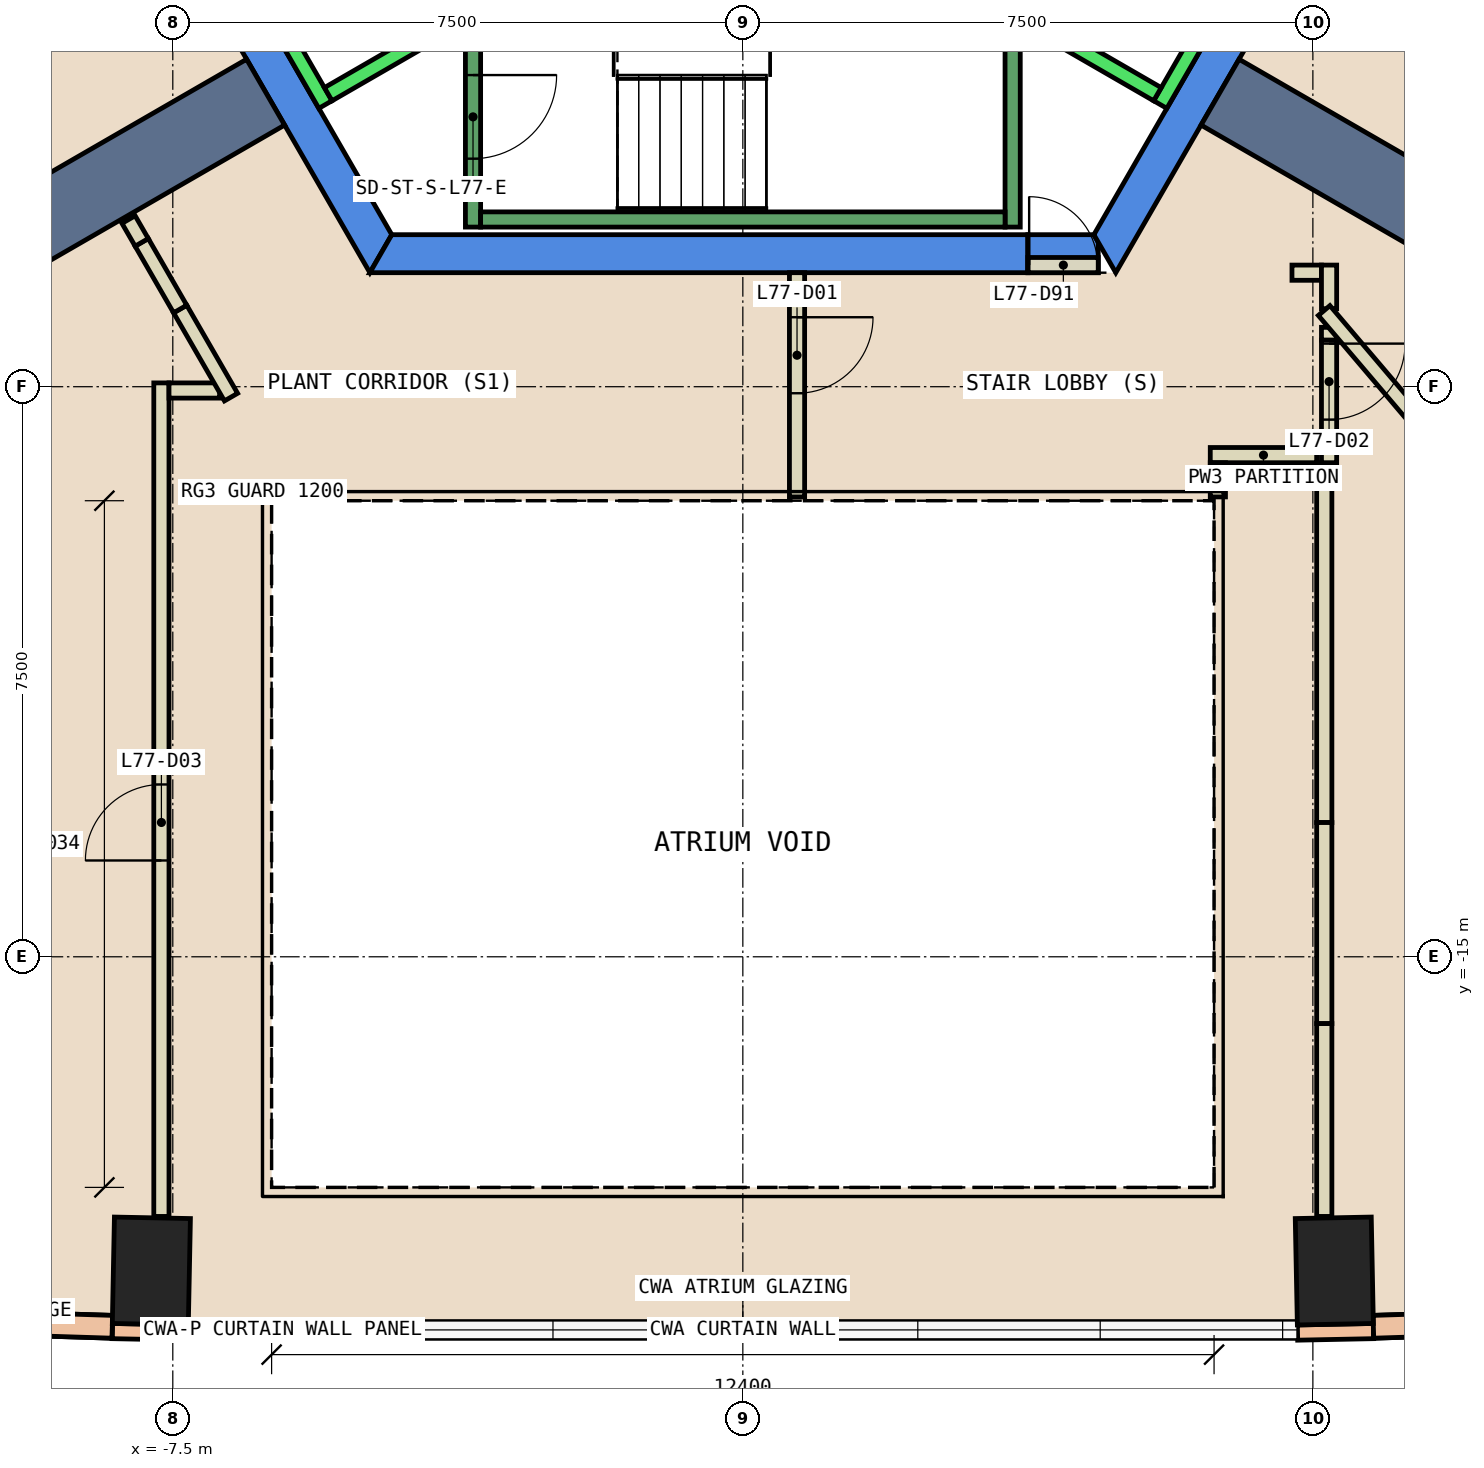
"""IFC4 building model, lengths in metres.
Left out: names, types, materials, properties, quantities, classifications, styles, units other than length and angle.
Written with IfcOpenShell. Run it as: python <this file> out.ifc"""

import sys

from ifc_helpers import new_model, si_unit, direction, frame, frame_2d, origin, origin_2d, place, context, subcontext, project, spatial, polyline, rectangle, outline, extrude, element, fill, save


model = new_model("IFC4")
c1 = context("Model", 3, precision=1e-05, world=origin(), true_north=direction((0.0, 1.0)))
c2 = subcontext(c1, "Body", "Model", "MODEL_VIEW")
j1 = project(units=[si_unit("LENGTHUNIT", "METRE"), si_unit("PLANEANGLEUNIT", "RADIAN")], contexts=[c1])
p1 = place(None, origin())
s1 = spatial("IfcSite", under=j1, at=p1, CompositionType="ELEMENT")
p2 = place(p1, origin())
s2 = spatial("IfcBuilding", under=s1, at=p2, CompositionType="ELEMENT")
p3 = place(p2, frame((0.0, 0.0, 326.0)))
s3 = spatial("IfcBuildingStorey", under=s2, at=p3, CompositionType="ELEMENT", Elevation=326.0)
for number, where, z_axis, x_axis in (
    (1, (-7.782, -19.134, -0.6), (0.0, 0.0, 1.0), (-1.0, 0.02, 0.0)),
    (2, (7.782, -19.134, -0.6), (0.0, 0.0, 1.0), (1.0, 0.02, 0.0)),
):
    element("IfcColumn", number, at=place(p3, frame(where, z_axis=z_axis, x_axis=x_axis)), inside=s3, PredefinedType="COLUMN", context=c2, shape_type="SweptSolid", body=[
        extrude(rectangle(XDim=1.0, YDim=1.4, at=origin_2d()), origin(), (0.0, 0.0, 1.0), 5.55),
    ])
p4 = place(p3, frame((0.0, 0.0, -0.6)))
e3 = element("IfcWall", 3, at=p4, inside=s3, PredefinedType="SHEAR", context=c2, shape_type="SweptSolid", body=[
    extrude(outline(polyline([(-9.815, 2.5), (-4.907, -6.0), (-4.619, -5.5), (-9.238, 2.5), (-9.815, 2.5)])), origin(), (0.0, 0.0, 1.0), 5.55),
])
p5 = place(p3, frame((0.0, 0.0, -0.6)))
e4 = element("IfcWall", 4, at=p5, inside=s3, PredefinedType="SHEAR", context=c2, shape_type="SweptSolid", body=[
    extrude(outline(polyline([(3.75, -6.0), (3.75, -5.5), (-4.619, -5.5), (-4.907, -6.0), (3.75, -6.0)])), origin(), (0.0, 0.0, 1.0), 5.55),
])
p6 = place(p3, frame((0.0, 0.0, 3.6)))
e5 = element("IfcWall", 5, at=p6, inside=s3, PredefinedType="SHEAR", context=c2, shape_type="SweptSolid", body=[
    extrude(outline(polyline([(4.676, -6.0), (4.676, -5.6), (4.619, -5.5), (3.75, -5.5), (3.75, -6.0), (4.676, -6.0)])), origin(), (0.0, 0.0, 1.0), 1.35),
])
p7 = place(p3, frame((0.0, 0.0, -0.6)))
e6 = element("IfcWall", 6, at=p7, inside=s3, PredefinedType="SHEAR", context=c2, shape_type="SweptSolid", body=[
    extrude(outline(polyline([(4.907, -6.0), (9.815, 2.5), (9.238, 2.5), (4.619, -5.5), (4.907, -6.0)])), origin(), (0.0, 0.0, 1.0), 5.55),
])
for number, where, z_axis, x_axis in (
    (7, (6.279, -3.625, 0.0), (0.0, 0.0, 1.0), (0.866, -0.5, 0.0)),
    (8, (-6.279, -3.625, 0.0), (0.0, 0.0, 1.0), (-0.866, -0.5, 0.0)),
):
    element("IfcWall", number, at=place(p3, frame(where, z_axis=z_axis, x_axis=x_axis)), inside=s3, PredefinedType="SHEAR", context=c2, shape_type="SweptSolid", body=[
        extrude(rectangle(XDim=17.452, YDim=1.0, at=frame_2d((8.726, 0.0))), origin(), (0.0, 0.0, 1.0), 4.95),
    ])
for number, where, z_axis, x_axis in (
    (9, (-8.298, -19.924, 0.0), (0.0, 0.0, 1.0), (1.0, -0.02, 0.0)),
    (10, (7.298, -19.944, 0.0), (0.0, 0.0, 1.0), (1.0, 0.02, 0.0)),
):
    element("IfcWall", number, at=place(p3, frame(where, z_axis=z_axis, x_axis=x_axis)), inside=s3, PredefinedType="STANDARD", context=c2, shape_type="SweptSolid", body=[
        extrude(rectangle(XDim=1.0, YDim=0.2, at=frame_2d((0.5, 0.0))), origin(), (0.0, 0.0, 1.0), 4.95),
    ])
p8 = place(p3, frame((-11.919, -19.753, 0.0), z_axis=(0.0, 0.0, 1.0), x_axis=(0.9994967126, -0.031722570865, 0.0)))
e11 = element("IfcWall", 11, at=p8, inside=s3, PredefinedType="STANDARD", context=c2, shape_type="SweptSolid", body=[
    extrude(rectangle(XDim=3.625, YDim=0.3, at=frame_2d((1.812, 0.0))), origin(), (0.0, 0.0, 1.0), 1.2),
])
p9 = place(p3, frame((-11.919, -19.753, 4.15), z_axis=(0.0, 0.0, 1.0), x_axis=(0.9994967126, -0.031722570865, 0.0)))
e12 = element("IfcWall", 12, at=p9, inside=s3, PredefinedType="STANDARD", context=c2, shape_type="SweptSolid", body=[
    extrude(rectangle(XDim=3.625, YDim=0.3, at=frame_2d((1.812, 0.0))), origin(), (0.0, 0.0, 1.0), 0.8),
])
p10 = place(p3, frame((8.296, -19.868, 0.0), z_axis=(0.0, 0.0, 1.0), x_axis=(0.9994967126, 0.031722570865, 0.0)))
e13 = element("IfcWall", 13, at=p10, inside=s3, PredefinedType="STANDARD", context=c2, shape_type="SweptSolid", body=[
    extrude(rectangle(XDim=3.625, YDim=0.3, at=frame_2d((1.812, 0.0))), origin(), (0.0, 0.0, 1.0), 1.2),
])
p11 = place(p3, frame((8.296, -19.868, 4.15), z_axis=(0.0, 0.0, 1.0), x_axis=(0.9994967126, 0.031722570865, 0.0)))
e14 = element("IfcWall", 14, at=p11, inside=s3, PredefinedType="STANDARD", context=c2, shape_type="SweptSolid", body=[
    extrude(rectangle(XDim=3.625, YDim=0.3, at=frame_2d((1.812, 0.0))), origin(), (0.0, 0.0, 1.0), 0.8),
])
p12 = place(p3, frame((0.713, -6.0, 0.0), z_axis=(0.0, 0.0, 1.0), x_axis=(0.0, -1.0, 0.0)))
e15 = element("IfcWall", 15, at=p12, inside=s3, PredefinedType="PARTITIONING", context=c2, shape_type="SweptSolid", body=[
    extrude(rectangle(XDim=2.95, YDim=0.2, at=frame_2d((1.475, 0.0))), origin(), (0.0, 0.0, 1.0), 4.95),
])
p13 = place(p12, frame((0.586, 0.0, 0.0)))
e16 = element("IfcOpeningElement", 16, at=p13, cuts=e15, PredefinedType="OPENING", context=c2, shape_type="SweptSolid", body=[
    extrude(rectangle(XDim=1.0, YDim=2.1, at=frame_2d((0.5, 1.05))), frame((0.0, 0.11, 0.0), z_axis=(0.0, -1.0, 0.0), x_axis=(1.0, 0.0, 0.0)), (0.0, 0.0, 1.0), 0.22),
])
p14 = place(p3, frame((7.55, -8.4, 0.0), z_axis=(0.0, 0.0, 1.0), x_axis=(-1.0, 0.0, 0.0)))
e17 = element("IfcWall", 17, at=p14, inside=s3, PredefinedType="PARTITIONING", context=c2, shape_type="SweptSolid", body=[
    extrude(rectangle(XDim=1.4, YDim=0.2, at=frame_2d((0.7, 0.0))), origin(), (0.0, 0.0, 1.0), 4.95),
])
p15 = place(p3, frame((6.25, -8.5, 0.0), z_axis=(0.0, 0.0, 1.0), x_axis=(0.0, -1.0, 0.0)))
e18 = element("IfcWall", 18, at=p15, inside=s3, PredefinedType="PARTITIONING", context=c2, shape_type="SweptSolid", body=[
    extrude(rectangle(XDim=0.45, YDim=0.2, at=frame_2d((0.225, 0.0))), origin(), (0.0, 0.0, 1.0), 4.95),
])
p16 = place(p3, frame((7.713, -6.719, 0.0), z_axis=(0.0, 0.0, 1.0), x_axis=(0.0, -1.0, 0.0)))
e19 = element("IfcWall", 19, at=p16, inside=s3, PredefinedType="PARTITIONING", context=c2, shape_type="SweptSolid", body=[
    extrude(rectangle(XDim=0.169, YDim=0.2, at=frame_2d((0.084, 0.0))), origin(), (0.0, 0.0, 1.0), 2.55),
])
p17 = place(p3, frame((7.225, -6.0, 0.0), z_axis=(0.0, 0.0, 1.0), x_axis=(1.0, 0.0, 0.0)))
e20 = element("IfcWall", 20, at=p17, inside=s3, PredefinedType="PARTITIONING", context=c2, shape_type="SweptSolid", body=[
    extrude(rectangle(XDim=0.388, YDim=0.2, at=frame_2d((0.194, 0.0))), origin(), (0.0, 0.0, 1.0), 2.55),
])
p18 = place(p3, frame((7.713, -5.9, 0.0), z_axis=(0.0, 0.0, 1.0), x_axis=(0.0, -1.0, 0.0)))
e21 = element("IfcWall", 21, at=p18, inside=s3, PredefinedType="PARTITIONING", context=c2, shape_type="SweptSolid", body=[
    extrude(rectangle(XDim=0.574, YDim=0.2, at=frame_2d((0.287, 0.0))), origin(), (0.0, 0.0, 1.0), 2.55),
])
p19 = place(p3, frame((7.65, -8.5, 0.0), z_axis=(0.0, 0.0, 1.0), x_axis=(0.0, -1.0, 0.0)))
e22 = element("IfcWall", 22, at=p19, inside=s3, PredefinedType="PARTITIONING", context=c2, shape_type="SweptSolid", body=[
    extrude(rectangle(XDim=4.734, YDim=0.2, at=frame_2d((2.367, 0.0))), origin(), (0.0, 0.0, 1.0), 4.95),
])
p20 = place(p3, frame((-7.65, -18.416, 0.0), z_axis=(0.0, 0.0, 1.0), x_axis=(0.0, 1.0, 0.0)))
e23 = element("IfcWall", 23, at=p20, inside=s3, PredefinedType="PARTITIONING", context=c2, shape_type="SweptSolid", body=[
    extrude(rectangle(XDim=10.966, YDim=0.2, at=frame_2d((5.483, 0.0))), origin(), (0.0, 0.0, 1.0), 4.95),
])
p21 = place(p20, frame((4.683, 0.0, 0.0)))
e24 = element("IfcOpeningElement", 24, at=p21, cuts=e23, PredefinedType="OPENING", context=c2, shape_type="SweptSolid", body=[
    extrude(rectangle(XDim=1.0, YDim=2.1, at=frame_2d((0.5, 1.05))), frame((0.0, 0.11, 0.0), z_axis=(0.0, -1.0, 0.0), x_axis=(1.0, 0.0, 0.0)), (0.0, 0.0, 1.0), 0.22),
])
p22 = place(p3, frame((-7.55, -7.55, 0.0), z_axis=(0.0, 0.0, 1.0), x_axis=(1.0, 0.0, 0.0)))
e25 = element("IfcWall", 25, at=p22, inside=s3, PredefinedType="PARTITIONING", context=c2, shape_type="SweptSolid", body=[
    extrude(rectangle(XDim=0.666, YDim=0.2, at=frame_2d((0.333, 0.0))), origin(), (0.0, 0.0, 1.0), 4.95),
])
p23 = place(p3, frame((-6.734, -7.637, 0.0), z_axis=(0.0, 0.0, 1.0), x_axis=(-0.500043546414, 0.866000260791, 0.0)))
e26 = element("IfcWall", 26, at=p23, inside=s3, PredefinedType="PARTITIONING", context=c2, shape_type="SweptSolid", body=[
    extrude(rectangle(XDim=1.338, YDim=0.2, at=frame_2d((0.669, 0.0))), origin(), (0.0, 0.0, 1.0), 4.95),
])
p24 = place(p3, frame((7.648, -6.498, 0.0), z_axis=(0.0, 0.0, 1.0), x_axis=(0.647664127958, -0.761925965798, 0.0)))
e27 = element("IfcWall", 27, at=p24, inside=s3, PredefinedType="PARTITIONING", context=c2, shape_type="SweptSolid", body=[
    extrude(rectangle(XDim=9.023, YDim=0.2, at=frame_2d((4.512, 0.0))), origin(), (0.0, 0.0, 1.0), 2.55),
])
p25 = place(p24, frame((7.13, 0.0, 0.0)))
e28 = element("IfcOpeningElement", 28, at=p25, cuts=e27, PredefinedType="OPENING", context=c2, shape_type="SweptSolid", body=[
    extrude(rectangle(XDim=1.0, YDim=2.1, at=frame_2d((0.5, 1.05))), frame((0.0, 0.11, 0.0), z_axis=(0.0, -1.0, 0.0), x_axis=(1.0, 0.0, 0.0)), (0.0, 0.0, 1.0), 0.22),
])
p26 = place(p3, frame((3.75, -5.9, 0.0), z_axis=(0.0, 0.0, 1.0), x_axis=(1.0, 0.0, 0.0)))
e29 = element("IfcWall", 29, at=p26, inside=s3, PredefinedType="PARTITIONING", context=c2, shape_type="SweptSolid", body=[
    extrude(rectangle(XDim=0.926, YDim=0.2, at=frame_2d((0.463, 0.0))), origin(), (0.0, 0.0, 1.0), 2.4),
])
p27 = place(p26, frame((0.017, 0.0, 0.0)))
e30 = element("IfcOpeningElement", 30, at=p27, cuts=e29, PredefinedType="OPENING", context=c2, shape_type="SweptSolid", body=[
    extrude(rectangle(XDim=0.9, YDim=2.1, at=frame_2d((0.45, 1.05))), frame((0.0, 0.11, 0.0), z_axis=(0.0, -1.0, 0.0), x_axis=(1.0, 0.0, 0.0)), (0.0, 0.0, 1.0), 0.22),
])
p28 = place(p3, frame((7.713, -6.888, 0.0), z_axis=(0.0, 0.0, 1.0), x_axis=(0.0, -1.0, 0.0)))
e31 = element("IfcWall", 31, at=p28, inside=s3, PredefinedType="PARTITIONING", context=c2, shape_type="SweptSolid", body=[
    extrude(rectangle(XDim=1.612, YDim=0.2, at=frame_2d((0.806, 0.0))), origin(), (0.0, 0.0, 1.0), 4.95),
])
p29 = place(p28, frame((0.045, 0.0, 0.0)))
e32 = element("IfcOpeningElement", 32, at=p29, cuts=e31, PredefinedType="OPENING", context=c2, shape_type="SweptSolid", body=[
    extrude(rectangle(XDim=1.0, YDim=2.1, at=frame_2d((0.5, 1.05))), frame((0.0, 0.11, 0.0), z_axis=(0.0, -1.0, 0.0), x_axis=(1.0, 0.0, 0.0)), (0.0, 0.0, 1.0), 0.22),
])
p30 = place(p3, frame((7.65, -13.234, 0.0), z_axis=(0.0, 0.0, 1.0), x_axis=(0.0, -1.0, 0.0)))
e33 = element("IfcWall", 33, at=p30, inside=s3, PredefinedType="PARTITIONING", context=c2, shape_type="SweptSolid", body=[
    extrude(rectangle(XDim=2.645, YDim=0.2, at=frame_2d((1.323, 0.0))), origin(), (0.0, 0.0, 1.0), 2.55),
])
p31 = place(p3, frame((7.65, -15.879, 0.0), z_axis=(0.0, 0.0, 1.0), x_axis=(0.0, -1.0, 0.0)))
e34 = element("IfcWall", 34, at=p31, inside=s3, PredefinedType="PARTITIONING", context=c2, shape_type="SweptSolid", body=[
    extrude(rectangle(XDim=2.537, YDim=0.2, at=frame_2d((1.269, 0.0))), origin(), (0.0, 0.0, 1.0), 4.95),
])
p32 = place(p3, frame((-7.403, -6.478, 0.0), z_axis=(0.0, 0.0, 1.0), x_axis=(-0.499666781426, 0.866217702163, 0.0)))
e35 = element("IfcWall", 35, at=p32, inside=s3, PredefinedType="PARTITIONING", context=c2, shape_type="SweptSolid", body=[
    extrude(rectangle(XDim=1.012, YDim=0.2, at=frame_2d((0.506, 0.0))), origin(), (0.0, 0.0, 1.0), 2.55),
])
p33 = place(p3, frame((-7.909, -5.601, 0.0), z_axis=(0.0, 0.0, 1.0), x_axis=(-0.499702115105, 0.866197319414, 0.0)))
e36 = element("IfcWall", 36, at=p33, inside=s3, PredefinedType="PARTITIONING", context=c2, shape_type="SweptSolid", body=[
    extrude(rectangle(XDim=0.346, YDim=0.2, at=frame_2d((0.173, 0.0))), origin(), (0.0, 0.0, 1.0), 4.95),
])
p34 = place(p3, frame((-22.497, -10.489, 0.0), z_axis=(0.0, 0.0, 1.0), x_axis=(0.866019262169, 0.500010637439, 0.0)))
e37 = element("IfcWall", 37, at=p34, inside=s3, PredefinedType="PARTITIONING", context=c2, shape_type="SweptSolid", body=[
    extrude(rectangle(XDim=17.478, YDim=0.2, at=frame_2d((8.739, 0.0))), origin(), (0.0, 0.0, 1.0), 4.95),
])
p35 = place(p3, frame((-8.192, 0.888, 0.0), z_axis=(0.0, 0.0, 1.0), x_axis=(0.500034260056, -0.866005622828, 0.0)))
e38 = element("IfcWall", 38, at=p35, inside=s3, PredefinedType="STANDARD", context=c2, shape_type="SweptSolid", body=[
    extrude(rectangle(XDim=5.399, YDim=0.2, at=frame_2d((2.7, 0.0))), origin(), (0.0, 0.0, 1.0), 4.95),
])
p36 = place(p3, frame((-3.377, -2.452, 0.0), z_axis=(0.0, 0.0, 1.0), x_axis=(-0.865955154139, -0.50012165622, 0.0)))
e39 = element("IfcWall", 39, at=p36, inside=s3, PredefinedType="STANDARD", context=c2, shape_type="SweptSolid", body=[
    extrude(rectangle(XDim=2.4, YDim=0.2, at=frame_2d((1.2, 0.0))), origin(), (0.0, 0.0, 1.0), 4.95),
])
p37 = place(p3, frame((5.492, -3.788, 0.0), z_axis=(0.0, 0.0, 1.0), x_axis=(0.500034260056, 0.866005622828, 0.0)))
e40 = element("IfcWall", 40, at=p37, inside=s3, PredefinedType="STANDARD", context=c2, shape_type="SweptSolid", body=[
    extrude(rectangle(XDim=5.399, YDim=0.2, at=frame_2d((2.7, 0.0))), origin(), (0.0, 0.0, 1.0), 4.95),
])
p38 = place(p3, frame((3.377, -2.452, 0.0), z_axis=(0.0, 0.0, 1.0), x_axis=(0.865955154139, -0.50012165622, 0.0)))
e41 = element("IfcWall", 41, at=p38, inside=s3, PredefinedType="STANDARD", context=c2, shape_type="SweptSolid", body=[
    extrude(rectangle(XDim=2.4, YDim=0.2, at=frame_2d((1.2, 0.0))), origin(), (0.0, 0.0, 1.0), 4.95),
])
p39 = place(p3, frame((-3.55, -1.0, 0.0), z_axis=(0.0, 0.0, 1.0), x_axis=(0.0, -1.0, 0.0)))
e42 = element("IfcWall", 42, at=p39, inside=s3, PredefinedType="STANDARD", context=c2, shape_type="SweptSolid", body=[
    extrude(rectangle(XDim=4.4, YDim=0.2, at=frame_2d((2.2, 0.0))), origin(), (0.0, 0.0, 1.0), 4.95),
])
p40 = place(p39, frame((2.4, 0.0, 0.0)))
e43 = element("IfcOpeningElement", 43, at=p40, cuts=e42, PredefinedType="OPENING", context=c2, shape_type="SweptSolid", body=[
    extrude(rectangle(XDim=1.1, YDim=2.2, at=frame_2d((0.55, 1.1))), frame((0.0, 0.11, 0.0), z_axis=(0.0, -1.0, 0.0), x_axis=(1.0, 0.0, 0.0)), (0.0, 0.0, 1.0), 0.22),
])
p41 = place(p3, frame((3.55, -2.667, 0.0), z_axis=(0.0, 0.0, 1.0), x_axis=(0.0, -1.0, 0.0)))
e44 = element("IfcWall", 44, at=p41, inside=s3, PredefinedType="STANDARD", context=c2, shape_type="SweptSolid", body=[
    extrude(rectangle(XDim=2.733, YDim=0.2, at=frame_2d((1.366, 0.0))), origin(), (0.0, 0.0, 1.0), 4.95),
])
p42 = place(p3, frame((-3.45, -5.3, 0.0), z_axis=(0.0, 0.0, 1.0), x_axis=(1.0, 0.0, 0.0)))
e45 = element("IfcWall", 45, at=p42, inside=s3, PredefinedType="STANDARD", context=c2, shape_type="SweptSolid", body=[
    extrude(rectangle(XDim=6.9, YDim=0.2, at=frame_2d((3.45, 0.0))), origin(), (0.0, 0.0, 1.0), 4.95),
])
p43 = place(p13, origin())
e46 = element("IfcDoor", 46, at=p43, inside=s3, OperationType="SINGLE_SWING_RIGHT", PredefinedType="DOOR", context=c2, shape_type="SweptSolid", body=[
    extrude(rectangle(XDim=1.0, YDim=2.1, at=frame_2d((0.5, 1.05))), frame((0.0, 0.025, 0.0), z_axis=(0.0, -1.0, 0.0), x_axis=(1.0, 0.0, 0.0)), (0.0, 0.0, 1.0), 0.05),
])
fill(e16, e46)
p44 = place(p29, origin())
e47 = element("IfcDoor", 47, at=p44, inside=s3, OperationType="SINGLE_SWING_LEFT", PredefinedType="DOOR", context=c2, shape_type="SweptSolid", body=[
    extrude(rectangle(XDim=1.0, YDim=2.1, at=frame_2d((0.5, 1.05))), frame((0.0, 0.025, 0.0), z_axis=(0.0, -1.0, 0.0), x_axis=(1.0, 0.0, 0.0)), (0.0, 0.0, 1.0), 0.05),
])
fill(e32, e47)
p45 = place(p21, origin())
e48 = element("IfcDoor", 48, at=p45, inside=s3, OperationType="SINGLE_SWING_RIGHT", PredefinedType="DOOR", context=c2, shape_type="SweptSolid", body=[
    extrude(rectangle(XDim=1.0, YDim=2.1, at=frame_2d((0.5, 1.05))), frame((0.0, 0.025, 0.0), z_axis=(0.0, -1.0, 0.0), x_axis=(1.0, 0.0, 0.0)), (0.0, 0.0, 1.0), 0.05),
])
fill(e24, e48)
p46 = place(p27, origin())
e49 = element("IfcDoor", 49, at=p46, inside=s3, OperationType="SINGLE_SWING_LEFT", PredefinedType="DOOR", context=c2, shape_type="SweptSolid", body=[
    extrude(rectangle(XDim=0.9, YDim=2.1, at=frame_2d((0.45, 1.05))), frame((0.0, 0.025, 0.0), z_axis=(0.0, -1.0, 0.0), x_axis=(1.0, 0.0, 0.0)), (0.0, 0.0, 1.0), 0.05),
])
fill(e30, e49)
p47 = place(p40, origin())
e50 = element("IfcDoor", 50, at=p47, inside=s3, OperationType="SINGLE_SWING_LEFT", PredefinedType="DOOR", context=c2, shape_type="SweptSolid", body=[
    extrude(rectangle(XDim=1.1, YDim=2.2, at=frame_2d((0.55, 1.1))), frame((0.0, 0.025, 0.0), z_axis=(0.0, -1.0, 0.0), x_axis=(1.0, 0.0, 0.0)), (0.0, 0.0, 1.0), 0.05),
])
fill(e43, e50)
save(model, sys.argv[1])
